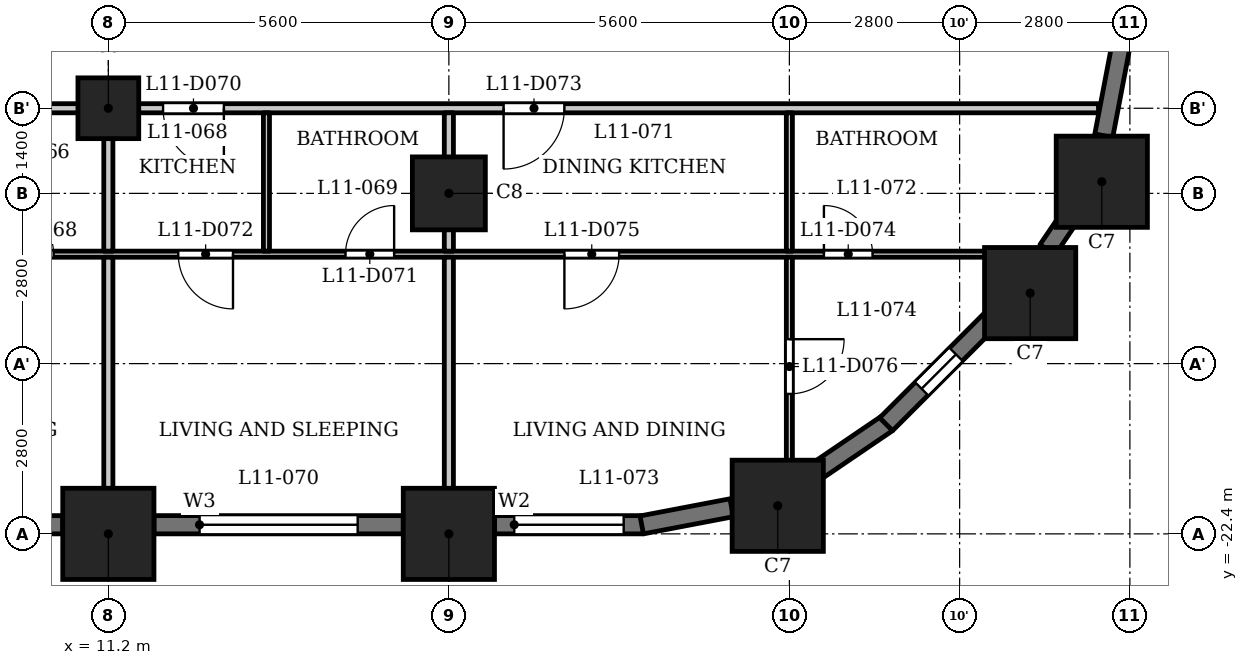
"""IFC4 building model, lengths in metres.
Left out: names, types, materials, properties, quantities, classifications, styles, units other than length and angle.
Written with IfcOpenShell. Run it as: python <this file> out.ifc"""

import sys

from ifc_helpers import new_model, si_unit, direction, frame, frame_2d, origin, origin_2d, place, context, subcontext, project, spatial, rectangle, extrude, element, fill, save


model = new_model("IFC4")
c1 = context("Model", 3, precision=1e-05, world=origin(), true_north=direction((0.0, 1.0)))
c2 = subcontext(c1, "Body", "Model", "MODEL_VIEW")
j1 = project(units=[si_unit("LENGTHUNIT", "METRE"), si_unit("PLANEANGLEUNIT", "RADIAN")], contexts=[c1])
p1 = place(None, origin())
s1 = spatial("IfcSite", under=j1, at=p1, CompositionType="ELEMENT")
p2 = place(p1, origin())
s2 = spatial("IfcBuilding", under=s1, at=p2, CompositionType="ELEMENT")
p3 = place(p2, frame((0.0, 0.0, 48.0)))
s3 = spatial("IfcBuildingStorey", under=s2, at=p3, CompositionType="ELEMENT", Elevation=48.0)
for number, where, z_axis, x_axis in (
    (1, (11.2, -22.4, 0.0), (0.0, 0.0, 1.0), (1.0, 0.0, 0.0)),
    (2, (16.8, -22.4, 0.0), (0.0, 0.0, 1.0), (1.0, 0.0, 0.0)),
    (3, (22.209, -21.938, 0.0), (0.0, 0.0, 1.0), (1.0, 0.0, 0.0)),
    (4, (26.36, -18.44, 0.0), (0.0, 0.0, 1.0), (1.0, 0.0, 0.0)),
    (5, (27.538, -16.609, 0.0), (0.0, 0.0, 1.0), (1.0, 0.0, 0.0)),
):
    element("IfcColumn", number, at=place(p3, frame(where, z_axis=z_axis, x_axis=x_axis)), inside=s3, PredefinedType="COLUMN", context=c2, shape_type="SweptSolid", body=[
        extrude(rectangle(XDim=1.5, YDim=1.5, at=origin_2d()), origin(), (0.0, 0.0, 1.0), 3.5),
    ])
p4 = place(p3, frame((16.8, -16.8, 0.0), z_axis=(0.0, 0.0, 1.0), x_axis=(1.0, 0.0, 0.0)))
e6 = element("IfcColumn", 6, at=p4, inside=s3, PredefinedType="COLUMN", context=c2, shape_type="SweptSolid", body=[
    extrude(rectangle(XDim=1.2, YDim=1.2, at=origin_2d()), origin(), (0.0, 0.0, 1.0), 3.5),
])
p5 = place(p3, frame((11.2, -15.4, 0.0), z_axis=(0.0, 0.0, 1.0), x_axis=(1.0, 0.0, 0.0)))
e7 = element("IfcColumn", 7, at=p5, inside=s3, PredefinedType="COLUMN", context=c2, shape_type="SweptSolid", body=[
    extrude(rectangle(XDim=1.0, YDim=1.0, at=origin_2d()), origin(), (0.0, 0.0, 1.0), 3.5),
])
p6 = place(p3, frame((6.35, -22.25, 0.0), z_axis=(0.0, 0.0, 1.0), x_axis=(1.0, 0.0, 0.0)))
e8 = element("IfcWall", 8, at=p6, inside=s3, PredefinedType="SOLIDWALL", context=c2, shape_type="SweptSolid", body=[
    extrude(rectangle(XDim=4.1, YDim=0.3, at=frame_2d((2.05, 0.0))), origin(), (0.0, 0.0, 1.0), 2.35),
])
p7 = place(p6, frame((0.75, 0.0, 0.9)))
e9 = element("IfcOpeningElement", 9, at=p7, cuts=e8, PredefinedType="OPENING", context=c2, shape_type="SweptSolid", body=[
    extrude(rectangle(XDim=2.6, YDim=1.25, at=frame_2d((1.3, 0.625))), frame((0.0, 0.16, 0.0), z_axis=(0.0, -1.0, 0.0), x_axis=(1.0, 0.0, 0.0)), (0.0, 0.0, 1.0), 0.32),
])
p8 = place(p3, frame((11.95, -22.25, 0.0), z_axis=(0.0, 0.0, 1.0), x_axis=(1.0, 0.0, 0.0)))
e10 = element("IfcWall", 10, at=p8, inside=s3, PredefinedType="SOLIDWALL", context=c2, shape_type="SweptSolid", body=[
    extrude(rectangle(XDim=4.1, YDim=0.3, at=frame_2d((2.05, 0.0))), origin(), (0.0, 0.0, 1.0), 2.35),
])
p9 = place(p8, frame((0.75, 0.0, 0.9)))
e11 = element("IfcOpeningElement", 11, at=p9, cuts=e10, PredefinedType="OPENING", context=c2, shape_type="SweptSolid", body=[
    extrude(rectangle(XDim=2.6, YDim=1.25, at=frame_2d((1.3, 0.625))), frame((0.0, 0.16, 0.0), z_axis=(0.0, -1.0, 0.0), x_axis=(1.0, 0.0, 0.0)), (0.0, 0.0, 1.0), 0.32),
])
p10 = place(p3, frame((17.55, -22.25, 0.0), z_axis=(0.0, 0.0, 1.0), x_axis=(1.0, 0.0, 0.0)))
e12 = element("IfcWall", 12, at=p10, inside=s3, PredefinedType="SOLIDWALL", context=c2, shape_type="SweptSolid", body=[
    extrude(rectangle(XDim=2.45, YDim=0.3, at=frame_2d((1.225, 0.0))), origin(), (0.0, 0.0, 1.0), 2.35),
])
p11 = place(p10, frame((0.325, 0.0, 0.9)))
e13 = element("IfcOpeningElement", 13, at=p11, cuts=e12, PredefinedType="OPENING", context=c2, shape_type="SweptSolid", body=[
    extrude(rectangle(XDim=1.8, YDim=1.25, at=frame_2d((0.9, 0.625))), frame((0.0, 0.16, 0.0), z_axis=(0.0, -1.0, 0.0), x_axis=(1.0, 0.0, 0.0)), (0.0, 0.0, 1.0), 0.32),
])
for number, where, z_axis, x_axis in (
    (14, (19.972, -22.253, 0.0), (0.0, 0.0, 1.0), (0.982, 0.187, 0.0)),
    (15, (22.767, -21.426, 0.0), (0.0, 0.0, 1.0), (0.827, 0.562, 0.0)),
):
    element("IfcWall", number, at=place(p3, frame(where, z_axis=z_axis, x_axis=x_axis)), inside=s3, PredefinedType="SOLIDWALL", context=c2, shape_type="SweptSolid", body=[
        extrude(rectangle(XDim=1.506, YDim=0.3, at=frame_2d((0.753, 0.0))), origin(), (0.0, 0.0, 1.0), 2.35),
    ])
p12 = place(p3, frame((23.991, -20.597, 0.0), z_axis=(0.0, 0.0, 1.0), x_axis=(0.707106781187, 0.707106781187, 0.0)))
e16 = element("IfcWall", 16, at=p12, inside=s3, PredefinedType="SOLIDWALL", context=c2, shape_type="SweptSolid", body=[
    extrude(rectangle(XDim=2.45, YDim=0.3, at=frame_2d((1.225, 0.0))), origin(), (0.0, 0.0, 1.0), 2.35),
])
p13 = place(p12, frame((0.825, 0.0, 0.6)))
e17 = element("IfcOpeningElement", 17, at=p13, cuts=e16, PredefinedType="OPENING", context=c2, shape_type="SweptSolid", body=[
    extrude(rectangle(XDim=0.8, YDim=1.55, at=frame_2d((0.4, 0.775))), frame((0.0, 0.16, 0.0), z_axis=(0.0, -1.0, 0.0), x_axis=(1.0, 0.0, 0.0)), (0.0, 0.0, 1.0), 0.32),
])
p14 = place(p3, frame((26.645, -17.727, 0.0), z_axis=(0.0, 0.0, 1.0), x_axis=(0.562083182981, 0.827080706709, 0.0)))
e18 = element("IfcWall", 18, at=p14, inside=s3, PredefinedType="SOLIDWALL", context=c2, shape_type="SweptSolid", body=[
    extrude(rectangle(XDim=0.677, YDim=0.3, at=frame_2d((0.339, 0.0))), origin(), (0.0, 0.0, 1.0), 3.2),
])
p15 = place(p3, frame((27.571, -15.851, 0.0), z_axis=(0.0, 0.0, 1.0), x_axis=(0.187223837635, 0.982317277982, 0.0)))
e19 = element("IfcWall", 19, at=p15, inside=s3, PredefinedType="SOLIDWALL", context=c2, shape_type="SweptSolid", body=[
    extrude(rectangle(XDim=1.506, YDim=0.3, at=frame_2d((0.753, 0.0))), origin(), (0.0, 0.0, 1.0), 2.35),
])
p16 = place(p3, frame((-26.394, -17.8, 0.0), z_axis=(0.0, 0.0, 1.0), x_axis=(1.0, 0.0, 0.0)))
e20 = element("IfcWall", 20, at=p16, inside=s3, PredefinedType="PARTITIONING", context=c2, shape_type="SweptSolid", body=[
    extrude(rectangle(XDim=53.126, YDim=0.1, at=frame_2d((26.563, 0.0))), origin(), (0.0, 0.0, 1.0), 3.2),
])
p17 = place(p16, frame((0.794, 0.0, 0.0)))
e21 = element("IfcOpeningElement", 21, at=p17, cuts=e20, PredefinedType="OPENING", context=c2, shape_type="SweptSolid", body=[
    extrude(rectangle(XDim=0.8, YDim=2.1, at=frame_2d((0.4, 1.05))), frame((0.0, 0.06, 0.0), z_axis=(0.0, -1.0, 0.0), x_axis=(1.0, 0.0, 0.0)), (0.0, 0.0, 1.0), 0.12),
])
p18 = place(p16, frame((5.644, 0.0, 0.0)))
e22 = element("IfcOpeningElement", 22, at=p18, cuts=e20, PredefinedType="OPENING", context=c2, shape_type="SweptSolid", body=[
    extrude(rectangle(XDim=0.9, YDim=2.1, at=frame_2d((0.45, 1.05))), frame((0.0, 0.06, 0.0), z_axis=(0.0, -1.0, 0.0), x_axis=(1.0, 0.0, 0.0)), (0.0, 0.0, 1.0), 0.12),
])
p19 = place(p16, frame((10.394, 0.0, 0.0)))
e23 = element("IfcOpeningElement", 23, at=p19, cuts=e20, PredefinedType="OPENING", context=c2, shape_type="SweptSolid", body=[
    extrude(rectangle(XDim=0.8, YDim=2.1, at=frame_2d((0.4, 1.05))), frame((0.0, 0.06, 0.0), z_axis=(0.0, -1.0, 0.0), x_axis=(1.0, 0.0, 0.0)), (0.0, 0.0, 1.0), 0.12),
])
p20 = place(p16, frame((13.244, 0.0, 0.0)))
e24 = element("IfcOpeningElement", 24, at=p20, cuts=e20, PredefinedType="OPENING", context=c2, shape_type="SweptSolid", body=[
    extrude(rectangle(XDim=0.9, YDim=2.1, at=frame_2d((0.45, 1.05))), frame((0.0, 0.06, 0.0), z_axis=(0.0, -1.0, 0.0), x_axis=(1.0, 0.0, 0.0)), (0.0, 0.0, 1.0), 0.12),
])
p21 = place(p16, frame((23.944, 0.0, 0.0)))
e25 = element("IfcOpeningElement", 25, at=p21, cuts=e20, PredefinedType="OPENING", context=c2, shape_type="SweptSolid", body=[
    extrude(rectangle(XDim=0.8, YDim=2.1, at=frame_2d((0.4, 1.05))), frame((0.0, 0.06, 0.0), z_axis=(0.0, -1.0, 0.0), x_axis=(1.0, 0.0, 0.0)), (0.0, 0.0, 1.0), 0.12),
])
p22 = place(p16, frame((22.194, 0.0, 0.0)))
e26 = element("IfcOpeningElement", 26, at=p22, cuts=e20, PredefinedType="OPENING", context=c2, shape_type="SweptSolid", body=[
    extrude(rectangle(XDim=0.9, YDim=2.1, at=frame_2d((0.45, 1.05))), frame((0.0, 0.06, 0.0), z_axis=(0.0, -1.0, 0.0), x_axis=(1.0, 0.0, 0.0)), (0.0, 0.0, 1.0), 0.12),
])
p23 = place(p16, frame((16.594, 0.0, 0.0)))
e27 = element("IfcOpeningElement", 27, at=p23, cuts=e20, PredefinedType="OPENING", context=c2, shape_type="SweptSolid", body=[
    extrude(rectangle(XDim=0.9, YDim=2.1, at=frame_2d((0.45, 1.05))), frame((0.0, 0.06, 0.0), z_axis=(0.0, -1.0, 0.0), x_axis=(1.0, 0.0, 0.0)), (0.0, 0.0, 1.0), 0.12),
])
p24 = place(p16, frame((18.844, 0.0, 0.0)))
e28 = element("IfcOpeningElement", 28, at=p24, cuts=e20, PredefinedType="OPENING", context=c2, shape_type="SweptSolid", body=[
    extrude(rectangle(XDim=0.9, YDim=2.1, at=frame_2d((0.45, 1.05))), frame((0.0, 0.06, 0.0), z_axis=(0.0, -1.0, 0.0), x_axis=(1.0, 0.0, 0.0)), (0.0, 0.0, 1.0), 0.12),
])
p25 = place(p16, frame((30.544, 0.0, 0.0)))
e29 = element("IfcOpeningElement", 29, at=p25, cuts=e20, PredefinedType="OPENING", context=c2, shape_type="SweptSolid", body=[
    extrude(rectangle(XDim=0.8, YDim=2.1, at=frame_2d((0.4, 1.05))), frame((0.0, 0.06, 0.0), z_axis=(0.0, -1.0, 0.0), x_axis=(1.0, 0.0, 0.0)), (0.0, 0.0, 1.0), 0.12),
])
p26 = place(p16, frame((27.294, 0.0, 0.0)))
e30 = element("IfcOpeningElement", 30, at=p26, cuts=e20, PredefinedType="OPENING", context=c2, shape_type="SweptSolid", body=[
    extrude(rectangle(XDim=0.9, YDim=2.1, at=frame_2d((0.45, 1.05))), frame((0.0, 0.06, 0.0), z_axis=(0.0, -1.0, 0.0), x_axis=(1.0, 0.0, 0.0)), (0.0, 0.0, 1.0), 0.12),
])
p27 = place(p16, frame((35.894, 0.0, 0.0)))
e31 = element("IfcOpeningElement", 31, at=p27, cuts=e20, PredefinedType="OPENING", context=c2, shape_type="SweptSolid", body=[
    extrude(rectangle(XDim=0.8, YDim=2.1, at=frame_2d((0.4, 1.05))), frame((0.0, 0.06, 0.0), z_axis=(0.0, -1.0, 0.0), x_axis=(1.0, 0.0, 0.0)), (0.0, 0.0, 1.0), 0.12),
])
p28 = place(p16, frame((33.644, 0.0, 0.0)))
e32 = element("IfcOpeningElement", 32, at=p28, cuts=e20, PredefinedType="OPENING", context=c2, shape_type="SweptSolid", body=[
    extrude(rectangle(XDim=0.9, YDim=2.1, at=frame_2d((0.45, 1.05))), frame((0.0, 0.06, 0.0), z_axis=(0.0, -1.0, 0.0), x_axis=(1.0, 0.0, 0.0)), (0.0, 0.0, 1.0), 0.12),
])
p29 = place(p16, frame((41.494, 0.0, 0.0)))
e33 = element("IfcOpeningElement", 33, at=p29, cuts=e20, PredefinedType="OPENING", context=c2, shape_type="SweptSolid", body=[
    extrude(rectangle(XDim=0.8, YDim=2.1, at=frame_2d((0.4, 1.05))), frame((0.0, 0.06, 0.0), z_axis=(0.0, -1.0, 0.0), x_axis=(1.0, 0.0, 0.0)), (0.0, 0.0, 1.0), 0.12),
])
p30 = place(p16, frame((38.744, 0.0, 0.0)))
e34 = element("IfcOpeningElement", 34, at=p30, cuts=e20, PredefinedType="OPENING", context=c2, shape_type="SweptSolid", body=[
    extrude(rectangle(XDim=0.9, YDim=2.1, at=frame_2d((0.45, 1.05))), frame((0.0, 0.06, 0.0), z_axis=(0.0, -1.0, 0.0), x_axis=(1.0, 0.0, 0.0)), (0.0, 0.0, 1.0), 0.12),
])
p31 = place(p16, frame((49.362, 0.0, 0.0)))
e35 = element("IfcOpeningElement", 35, at=p31, cuts=e20, PredefinedType="OPENING", context=c2, shape_type="SweptSolid", body=[
    extrude(rectangle(XDim=0.8, YDim=2.1, at=frame_2d((0.4, 1.05))), frame((0.0, 0.06, 0.0), z_axis=(0.0, -1.0, 0.0), x_axis=(1.0, 0.0, 0.0)), (0.0, 0.0, 1.0), 0.12),
])
p32 = place(p16, frame((45.094, 0.0, 0.0)))
e36 = element("IfcOpeningElement", 36, at=p32, cuts=e20, PredefinedType="OPENING", context=c2, shape_type="SweptSolid", body=[
    extrude(rectangle(XDim=0.9, YDim=2.1, at=frame_2d((0.45, 1.05))), frame((0.0, 0.06, 0.0), z_axis=(0.0, -1.0, 0.0), x_axis=(1.0, 0.0, 0.0)), (0.0, 0.0, 1.0), 0.12),
])
p33 = place(p3, frame((-27.484, -15.4, 0.0), z_axis=(0.0, 0.0, 1.0), x_axis=(1.0, 0.0, 0.0)))
e37 = element("IfcWall", 37, at=p33, inside=s3, PredefinedType="PARTITIONING", context=c2, shape_type="SweptSolid", body=[
    extrude(rectangle(XDim=54.968, YDim=0.15, at=frame_2d((27.484, 0.0))), origin(), (0.0, 0.0, 1.0), 3.2),
])
p34 = place(p33, frame((5.734, 0.0, 0.0)))
e38 = element("IfcOpeningElement", 38, at=p34, cuts=e37, PredefinedType="OPENING", context=c2, shape_type="SweptSolid", body=[
    extrude(rectangle(XDim=1.0, YDim=2.1, at=frame_2d((0.5, 1.05))), frame((0.0, 0.085, 0.0), z_axis=(0.0, -1.0, 0.0), x_axis=(1.0, 0.0, 0.0)), (0.0, 0.0, 1.0), 0.17),
])
p35 = place(p33, frame((13.334, 0.0, 0.0)))
e39 = element("IfcOpeningElement", 39, at=p35, cuts=e37, PredefinedType="OPENING", context=c2, shape_type="SweptSolid", body=[
    extrude(rectangle(XDim=1.0, YDim=2.1, at=frame_2d((0.5, 1.05))), frame((0.0, 0.085, 0.0), z_axis=(0.0, -1.0, 0.0), x_axis=(1.0, 0.0, 0.0)), (0.0, 0.0, 1.0), 0.17),
])
p36 = place(p33, frame((20.184, 0.0, 0.0)))
e40 = element("IfcOpeningElement", 40, at=p36, cuts=e37, PredefinedType="OPENING", context=c2, shape_type="SweptSolid", body=[
    extrude(rectangle(XDim=1.0, YDim=2.1, at=frame_2d((0.5, 1.05))), frame((0.0, 0.085, 0.0), z_axis=(0.0, -1.0, 0.0), x_axis=(1.0, 0.0, 0.0)), (0.0, 0.0, 1.0), 0.17),
])
p37 = place(p33, frame((29.384, 0.0, 0.0)))
e41 = element("IfcOpeningElement", 41, at=p37, cuts=e37, PredefinedType="OPENING", context=c2, shape_type="SweptSolid", body=[
    extrude(rectangle(XDim=1.0, YDim=2.1, at=frame_2d((0.5, 1.05))), frame((0.0, 0.085, 0.0), z_axis=(0.0, -1.0, 0.0), x_axis=(1.0, 0.0, 0.0)), (0.0, 0.0, 1.0), 0.17),
])
p38 = place(p33, frame((33.734, 0.0, 0.0)))
e42 = element("IfcOpeningElement", 42, at=p38, cuts=e37, PredefinedType="OPENING", context=c2, shape_type="SweptSolid", body=[
    extrude(rectangle(XDim=1.0, YDim=2.1, at=frame_2d((0.5, 1.05))), frame((0.0, 0.085, 0.0), z_axis=(0.0, -1.0, 0.0), x_axis=(1.0, 0.0, 0.0)), (0.0, 0.0, 1.0), 0.17),
])
p39 = place(p33, frame((39.584, 0.0, 0.0)))
e43 = element("IfcOpeningElement", 43, at=p39, cuts=e37, PredefinedType="OPENING", context=c2, shape_type="SweptSolid", body=[
    extrude(rectangle(XDim=1.0, YDim=2.1, at=frame_2d((0.5, 1.05))), frame((0.0, 0.085, 0.0), z_axis=(0.0, -1.0, 0.0), x_axis=(1.0, 0.0, 0.0)), (0.0, 0.0, 1.0), 0.17),
])
p40 = place(p33, frame((45.184, 0.0, 0.0)))
e44 = element("IfcOpeningElement", 44, at=p40, cuts=e37, PredefinedType="OPENING", context=c2, shape_type="SweptSolid", body=[
    extrude(rectangle(XDim=1.0, YDim=2.1, at=frame_2d((0.5, 1.05))), frame((0.0, 0.085, 0.0), z_axis=(0.0, -1.0, 0.0), x_axis=(1.0, 0.0, 0.0)), (0.0, 0.0, 1.0), 0.17),
])
p41 = place(p3, frame((11.2, -23.13, 0.0), z_axis=(0.0, 0.0, 1.0), x_axis=(0.0, 1.0, 0.0)))
e45 = element("IfcWall", 45, at=p41, inside=s3, PredefinedType="PARTITIONING", context=c2, shape_type="SweptSolid", body=[
    extrude(rectangle(XDim=5.28, YDim=0.15, at=frame_2d((2.64, 0.0))), origin(), (0.0, 0.0, 1.0), 3.2),
])
p42 = place(p3, frame((11.2, -17.75, 0.0), z_axis=(0.0, 0.0, 1.0), x_axis=(0.0, 1.0, 0.0)))
e46 = element("IfcWall", 46, at=p42, inside=s3, PredefinedType="PARTITIONING", context=c2, shape_type="SweptSolid", body=[
    extrude(rectangle(XDim=2.275, YDim=0.15, at=frame_2d((1.137, 0.0))), origin(), (0.0, 0.0, 1.0), 3.2),
])
p43 = place(p3, frame((13.8, -17.75, 0.0), z_axis=(0.0, 0.0, 1.0), x_axis=(0.0, 1.0, 0.0)))
e47 = element("IfcWall", 47, at=p43, inside=s3, PredefinedType="PARTITIONING", context=c2, shape_type="SweptSolid", body=[
    extrude(rectangle(XDim=2.275, YDim=0.1, at=frame_2d((1.137, 0.0))), origin(), (0.0, 0.0, 1.0), 3.2),
])
p44 = place(p3, frame((16.8, -23.13, 0.0), z_axis=(0.0, 0.0, 1.0), x_axis=(0.0, 1.0, 0.0)))
e48 = element("IfcWall", 48, at=p44, inside=s3, PredefinedType="PARTITIONING", context=c2, shape_type="SweptSolid", body=[
    extrude(rectangle(XDim=5.28, YDim=0.15, at=frame_2d((2.64, 0.0))), origin(), (0.0, 0.0, 1.0), 3.2),
])
p45 = place(p3, frame((16.8, -17.75, 0.0), z_axis=(0.0, 0.0, 1.0), x_axis=(0.0, 1.0, 0.0)))
e49 = element("IfcWall", 49, at=p45, inside=s3, PredefinedType="PARTITIONING", context=c2, shape_type="SweptSolid", body=[
    extrude(rectangle(XDim=2.275, YDim=0.15, at=frame_2d((1.137, 0.0))), origin(), (0.0, 0.0, 1.0), 3.2),
])
p46 = place(p3, frame((22.4, -21.72, 0.0), z_axis=(0.0, 0.0, 1.0), x_axis=(0.0, 1.0, 0.0)))
e50 = element("IfcWall", 50, at=p46, inside=s3, PredefinedType="PARTITIONING", context=c2, shape_type="SweptSolid", body=[
    extrude(rectangle(XDim=3.87, YDim=0.1, at=frame_2d((1.935, 0.0))), origin(), (0.0, 0.0, 1.0), 3.2),
])
p47 = place(p46, frame((1.622, 0.0, 0.0)))
e51 = element("IfcOpeningElement", 51, at=p47, cuts=e50, PredefinedType="OPENING", context=c2, shape_type="SweptSolid", body=[
    extrude(rectangle(XDim=0.9, YDim=2.1, at=frame_2d((0.45, 1.05))), frame((0.0, 0.06, 0.0), z_axis=(0.0, -1.0, 0.0), x_axis=(1.0, 0.0, 0.0)), (0.0, 0.0, 1.0), 0.12),
])
p48 = place(p3, frame((22.4, -17.75, 0.0), z_axis=(0.0, 0.0, 1.0), x_axis=(0.0, 1.0, 0.0)))
e52 = element("IfcWall", 52, at=p48, inside=s3, PredefinedType="PARTITIONING", context=c2, shape_type="SweptSolid", body=[
    extrude(rectangle(XDim=2.275, YDim=0.1, at=frame_2d((1.137, 0.0))), origin(), (0.0, 0.0, 1.0), 3.2),
])
p49 = place(p27, origin())
e53 = element("IfcDoor", 53, at=p49, inside=s3, OperationType="SINGLE_SWING_RIGHT", PredefinedType="DOOR", context=c2, shape_type="SweptSolid", body=[
    extrude(rectangle(XDim=0.8, YDim=2.1, at=frame_2d((0.4, 1.05))), frame((0.0, 0.025, 0.0), z_axis=(0.0, -1.0, 0.0), x_axis=(1.0, 0.0, 0.0)), (0.0, 0.0, 1.0), 0.05),
])
fill(e31, e53)
p50 = place(p39, origin())
e54 = element("IfcDoor", 54, at=p50, inside=s3, OperationType="SINGLE_SWING_RIGHT", PredefinedType="DOOR", context=c2, shape_type="SweptSolid", body=[
    extrude(rectangle(XDim=1.0, YDim=2.1, at=frame_2d((0.5, 1.05))), frame((0.0, 0.025, 0.0), z_axis=(0.0, -1.0, 0.0), x_axis=(1.0, 0.0, 0.0)), (0.0, 0.0, 1.0), 0.05),
])
fill(e43, e54)
p51 = place(p29, origin())
e55 = element("IfcDoor", 55, at=p51, inside=s3, OperationType="SINGLE_SWING_LEFT", PredefinedType="DOOR", context=c2, shape_type="SweptSolid", body=[
    extrude(rectangle(XDim=0.8, YDim=2.1, at=frame_2d((0.4, 1.05))), frame((0.0, 0.025, 0.0), z_axis=(0.0, -1.0, 0.0), x_axis=(1.0, 0.0, 0.0)), (0.0, 0.0, 1.0), 0.05),
])
fill(e33, e55)
p52 = place(p30, origin())
e56 = element("IfcDoor", 56, at=p52, inside=s3, OperationType="SINGLE_SWING_RIGHT", PredefinedType="DOOR", context=c2, shape_type="SweptSolid", body=[
    extrude(rectangle(XDim=0.9, YDim=2.1, at=frame_2d((0.45, 1.05))), frame((0.0, 0.025, 0.0), z_axis=(0.0, -1.0, 0.0), x_axis=(1.0, 0.0, 0.0)), (0.0, 0.0, 1.0), 0.05),
])
fill(e34, e56)
p53 = place(p40, origin())
e57 = element("IfcDoor", 57, at=p53, inside=s3, OperationType="SINGLE_SWING_LEFT", PredefinedType="DOOR", context=c2, shape_type="SweptSolid", body=[
    extrude(rectangle(XDim=1.0, YDim=2.1, at=frame_2d((0.5, 1.05))), frame((0.0, 0.025, 0.0), z_axis=(0.0, -1.0, 0.0), x_axis=(1.0, 0.0, 0.0)), (0.0, 0.0, 1.0), 0.05),
])
fill(e44, e57)
p54 = place(p31, origin())
e58 = element("IfcDoor", 58, at=p54, inside=s3, OperationType="SINGLE_SWING_RIGHT", PredefinedType="DOOR", context=c2, shape_type="SweptSolid", body=[
    extrude(rectangle(XDim=0.8, YDim=2.1, at=frame_2d((0.4, 1.05))), frame((0.0, 0.025, 0.0), z_axis=(0.0, -1.0, 0.0), x_axis=(1.0, 0.0, 0.0)), (0.0, 0.0, 1.0), 0.05),
])
fill(e35, e58)
p55 = place(p32, origin())
e59 = element("IfcDoor", 59, at=p55, inside=s3, OperationType="SINGLE_SWING_LEFT", PredefinedType="DOOR", context=c2, shape_type="SweptSolid", body=[
    extrude(rectangle(XDim=0.9, YDim=2.1, at=frame_2d((0.45, 1.05))), frame((0.0, 0.025, 0.0), z_axis=(0.0, -1.0, 0.0), x_axis=(1.0, 0.0, 0.0)), (0.0, 0.0, 1.0), 0.05),
])
fill(e36, e59)
p56 = place(p47, origin())
e60 = element("IfcDoor", 60, at=p56, inside=s3, OperationType="SINGLE_SWING_RIGHT", PredefinedType="DOOR", context=c2, shape_type="SweptSolid", body=[
    extrude(rectangle(XDim=0.9, YDim=2.1, at=frame_2d((0.45, 1.05))), frame((0.0, 0.025, 0.0), z_axis=(0.0, -1.0, 0.0), x_axis=(1.0, 0.0, 0.0)), (0.0, 0.0, 1.0), 0.05),
])
fill(e51, e60)
p57 = place(p9, origin())
e61 = element("IfcWindow", 61, at=p57, inside=s3, PartitioningType="SINGLE_PANEL", PredefinedType="WINDOW", context=c2, shape_type="SweptSolid", body=[
    extrude(rectangle(XDim=2.6, YDim=1.25, at=frame_2d((1.3, 0.625))), frame((0.0, 0.03, 0.0), z_axis=(0.0, -1.0, 0.0), x_axis=(1.0, 0.0, 0.0)), (0.0, 0.0, 1.0), 0.06),
])
fill(e11, e61)
p58 = place(p11, origin())
e62 = element("IfcWindow", 62, at=p58, inside=s3, PartitioningType="SINGLE_PANEL", PredefinedType="WINDOW", context=c2, shape_type="SweptSolid", body=[
    extrude(rectangle(XDim=1.8, YDim=1.25, at=frame_2d((0.9, 0.625))), frame((0.0, 0.03, 0.0), z_axis=(0.0, -1.0, 0.0), x_axis=(1.0, 0.0, 0.0)), (0.0, 0.0, 1.0), 0.06),
])
fill(e13, e62)
p59 = place(p13, origin())
e63 = element("IfcWindow", 63, at=p59, inside=s3, PartitioningType="SINGLE_PANEL", PredefinedType="WINDOW", context=c2, shape_type="SweptSolid", body=[
    extrude(rectangle(XDim=0.8, YDim=1.55, at=frame_2d((0.4, 0.775))), frame((0.0, 0.03, 0.0), z_axis=(0.0, -1.0, 0.0), x_axis=(1.0, 0.0, 0.0)), (0.0, 0.0, 1.0), 0.06),
])
fill(e17, e63)
save(model, sys.argv[1])
